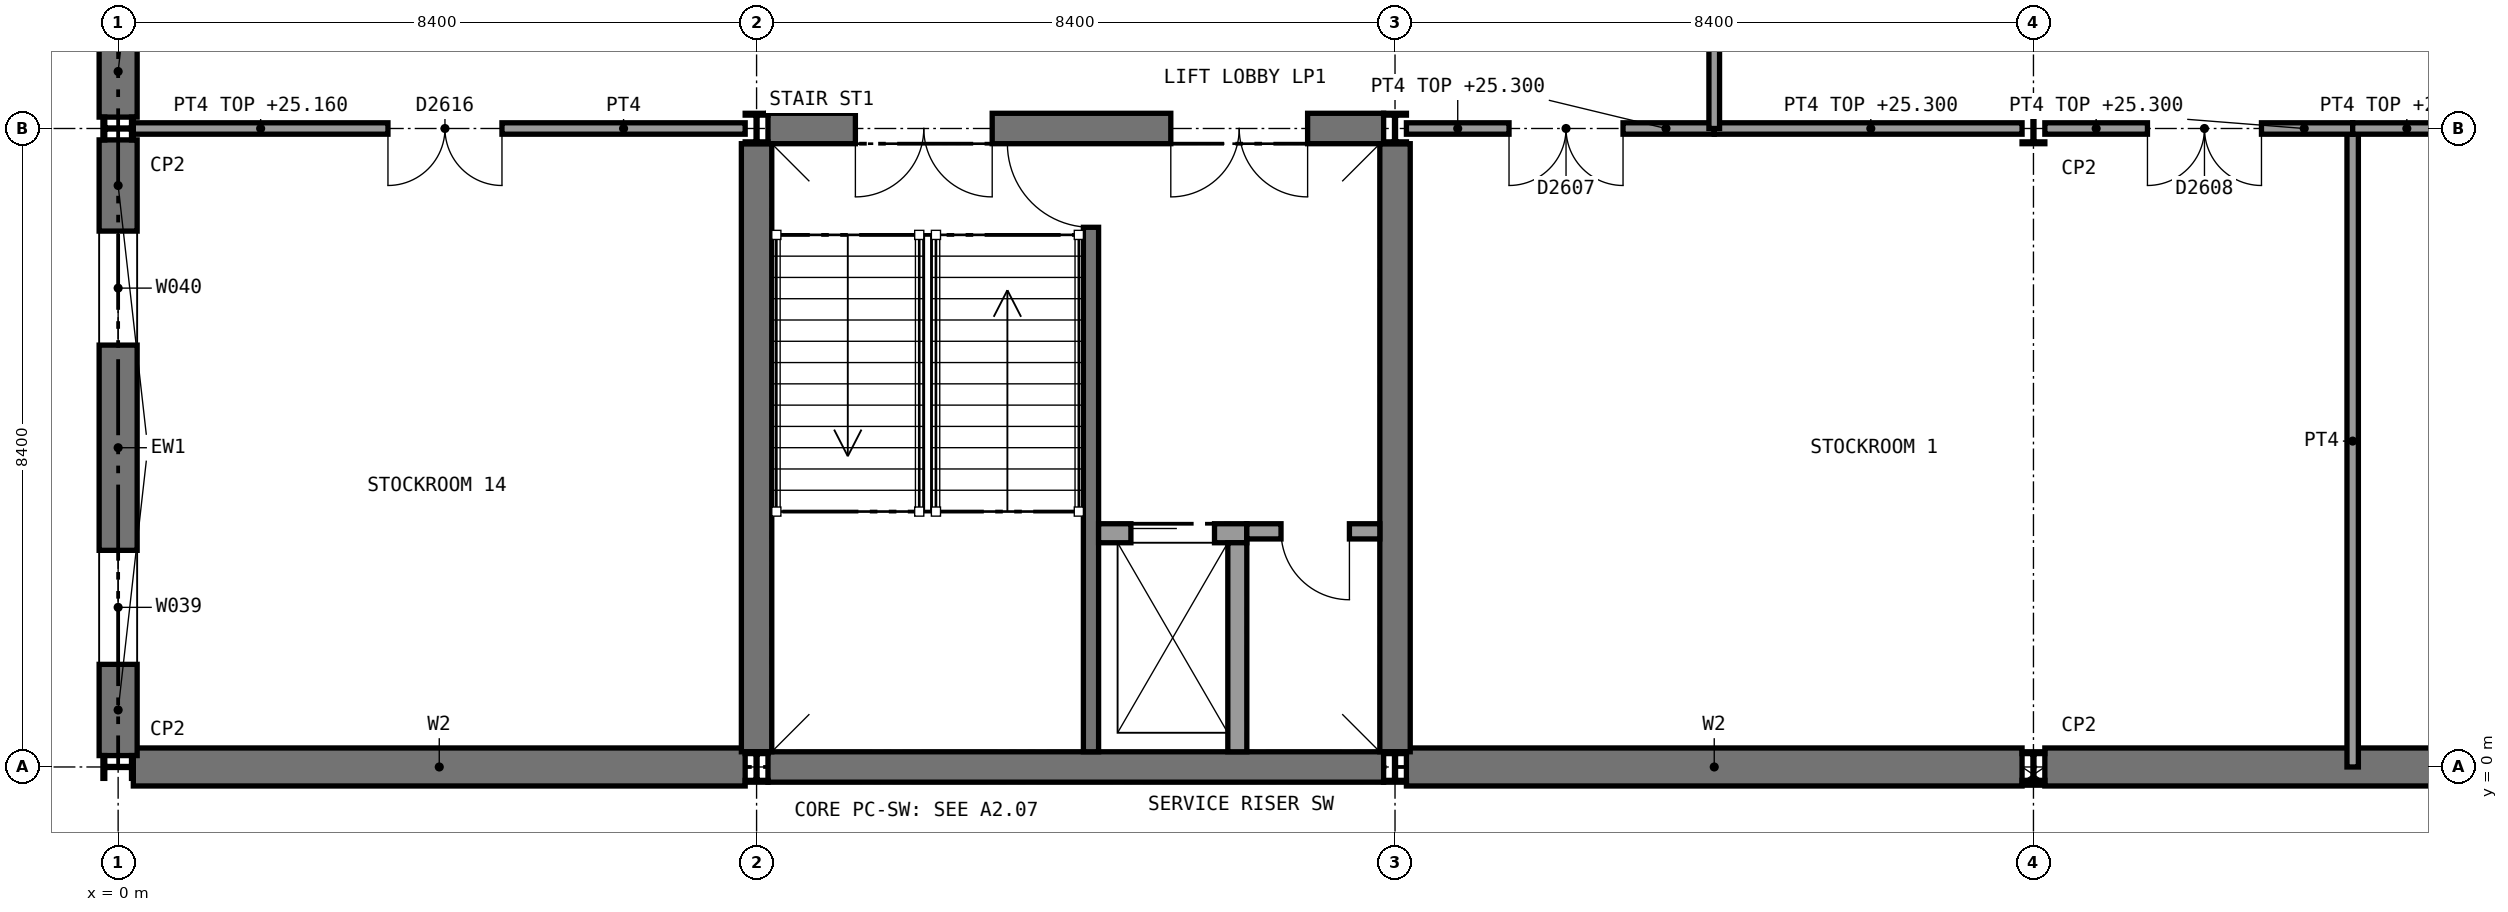
"""IFC4 building model, lengths in metres.
Left out: names, types, materials, properties, quantities, classifications, styles, units other than length and angle.
Written with IfcOpenShell. Run it as: python <this file> out.ifc"""

import sys

from ifc_helpers import new_model, si_unit, direction, frame, frame_2d, origin, origin_2d, place, context, subcontext, project, spatial, rectangle, i_section, extrude, element, fill, save


model = new_model("IFC4")
c1 = context("Model", 3, precision=1e-05, world=origin(), true_north=direction((0.0, 1.0)))
c2 = subcontext(c1, "Body", "Model", "MODEL_VIEW")
j1 = project(units=[si_unit("LENGTHUNIT", "METRE"), si_unit("PLANEANGLEUNIT", "RADIAN")], contexts=[c1])
p1 = place(None, origin())
s1 = spatial("IfcSite", under=j1, at=p1, CompositionType="ELEMENT")
p2 = place(p1, origin())
s2 = spatial("IfcBuilding", under=s1, at=p2, CompositionType="ELEMENT")
p3 = place(p2, frame((0.0, 0.0, 21.0)))
s3 = spatial("IfcBuildingStorey", under=s2, at=p3, CompositionType="ELEMENT", Elevation=21.0)
p4 = place(p3, frame((0.2, 0.0, 0.0), z_axis=(0.0, 0.0, 1.0), x_axis=(1.0, 0.0, 0.0)))
e1 = element("IfcWall", 1, at=p4, inside=s3, PredefinedType="SHEAR", context=c2, shape_type="SweptSolid", body=[
    extrude(rectangle(XDim=8.05, YDim=0.5, at=frame_2d((4.025, 0.0))), origin(), (0.0, 0.0, 1.0), 4.65),
])
p5 = place(p3, frame((16.95, 0.0, 0.0), z_axis=(0.0, 0.0, 1.0), x_axis=(1.0, 0.0, 0.0)))
e2 = element("IfcWall", 2, at=p5, inside=s3, PredefinedType="SHEAR", context=c2, shape_type="SweptSolid", body=[
    extrude(rectangle(XDim=8.1, YDim=0.5, at=frame_2d((4.05, 0.0))), origin(), (0.0, 0.0, 1.0), 4.65),
])
p6 = place(p3, frame((25.35, 0.0, 0.0), z_axis=(0.0, 0.0, 1.0), x_axis=(1.0, 0.0, 0.0)))
e3 = element("IfcWall", 3, at=p6, inside=s3, PredefinedType="SHEAR", context=c2, shape_type="SweptSolid", body=[
    extrude(rectangle(XDim=8.1, YDim=0.5, at=frame_2d((4.05, 0.0))), origin(), (0.0, 0.0, 1.0), 4.65),
])
p7 = place(p3, frame((8.55, 0.0, 0.0), z_axis=(0.0, 0.0, 1.0), x_axis=(1.0, 0.0, 0.0)))
e4 = element("IfcWall", 4, at=p7, inside=s3, PredefinedType="SHEAR", context=c2, shape_type="SweptSolid", body=[
    extrude(rectangle(XDim=8.1, YDim=0.4, at=frame_2d((4.05, 0.0))), origin(), (0.0, 0.0, 1.0), 4.65),
])
p8 = place(p3, frame((8.55, 8.4, 0.0), z_axis=(0.0, 0.0, 1.0), x_axis=(1.0, 0.0, 0.0)))
e5 = element("IfcWall", 5, at=p8, inside=s3, PredefinedType="SHEAR", context=c2, shape_type="SweptSolid", body=[
    extrude(rectangle(XDim=8.1, YDim=0.4, at=frame_2d((4.05, 0.0))), origin(), (0.0, 0.0, 1.0), 4.65),
])
p9 = place(p8, frame((1.15, 0.0, 0.0)))
e6 = element("IfcOpeningElement", 6, at=p9, cuts=e5, PredefinedType="OPENING", context=c2, shape_type="SweptSolid", body=[
    extrude(rectangle(XDim=1.8, YDim=2.1, at=frame_2d((0.9, 1.05))), frame((0.0, 0.21, 0.0), z_axis=(0.0, -1.0, 0.0), x_axis=(1.0, 0.0, 0.0)), (0.0, 0.0, 1.0), 0.42),
])
p10 = place(p8, frame((5.3, 0.0, 0.0)))
e7 = element("IfcOpeningElement", 7, at=p10, cuts=e5, PredefinedType="OPENING", context=c2, shape_type="SweptSolid", body=[
    extrude(rectangle(XDim=1.8, YDim=2.1, at=frame_2d((0.9, 1.05))), frame((0.0, 0.21, 0.0), z_axis=(0.0, -1.0, 0.0), x_axis=(1.0, 0.0, 0.0)), (0.0, 0.0, 1.0), 0.42),
])
for number, where, z_axis, x_axis in (
    (8, (8.4, 0.2, 0.0), (0.0, 0.0, 1.0), (0.0, 1.0, 0.0)),
    (9, (16.8, 0.2, 0.0), (0.0, 0.0, 1.0), (0.0, 1.0, 0.0)),
):
    element("IfcWall", number, at=place(p3, frame(where, z_axis=z_axis, x_axis=x_axis)), inside=s3, PredefinedType="SHEAR", context=c2, shape_type="SweptSolid", body=[
        extrude(rectangle(XDim=8.0, YDim=0.4, at=frame_2d((4.0, 0.0))), origin(), (0.0, 0.0, 1.0), 4.65),
    ])
for number, where, z_axis, x_axis in (
    (10, (0.0, 0.0, 0.0), (0.0, 0.0, 1.0), (0.0, 1.0, 0.0)),
    (11, (0.0, 8.4, 0.0), (0.0, 0.0, 1.0), (0.0, 1.0, 0.0)),
    (12, (8.4, 0.0, 0.0), (0.0, 0.0, 1.0), (1.0, 0.0, 0.0)),
    (13, (8.4, 8.4, 0.0), (0.0, 0.0, 1.0), (1.0, 0.0, 0.0)),
    (14, (16.8, 0.0, 0.0), (0.0, 0.0, 1.0), (1.0, 0.0, 0.0)),
    (15, (16.8, 8.4, 0.0), (0.0, 0.0, 1.0), (1.0, 0.0, 0.0)),
    (16, (25.2, 0.0, 0.0), (0.0, 0.0, 1.0), (1.0, 0.0, 0.0)),
    (17, (25.2, 8.4, 0.0), (0.0, 0.0, 1.0), (1.0, 0.0, 0.0)),
):
    element("IfcColumn", number, at=place(p3, frame(where, z_axis=z_axis, x_axis=x_axis)), inside=s3, PredefinedType="COLUMN", context=c2, shape_type="SweptSolid", body=[
        extrude(i_section(OverallWidth=0.3, OverallDepth=0.4, WebThickness=0.013, FlangeThickness=0.024, FilletRadius=0.027, at=origin_2d()), origin(), (0.0, 0.0, 1.0), 4.8),
    ])
p11 = place(p3, frame((29.4, 0.0, 0.0), z_axis=(0.0, 0.0, 1.0), x_axis=(0.0, 1.0, 0.0)))
e18 = element("IfcWall", 18, at=p11, inside=s3, PredefinedType="SOLIDWALL", context=c2, shape_type="SweptSolid", body=[
    extrude(rectangle(XDim=8.4, YDim=0.15, at=frame_2d((4.2, 0.0))), origin(), (0.0, 0.0, 1.0), 4.65),
])
p12 = place(p3, frame((16.95, 8.4, 0.0), z_axis=(0.0, 0.0, 1.0), x_axis=(1.0, 0.0, 0.0)))
e19 = element("IfcWall", 19, at=p12, inside=s3, PredefinedType="SOLIDWALL", context=c2, shape_type="SweptSolid", body=[
    extrude(rectangle(XDim=4.05, YDim=0.15, at=frame_2d((2.025, 0.0))), origin(), (0.0, 0.0, 1.0), 4.3),
])
p13 = place(p12, frame((1.35, 0.0, 0.0)))
e20 = element("IfcOpeningElement", 20, at=p13, cuts=e19, PredefinedType="OPENING", context=c2, shape_type="SweptSolid", body=[
    extrude(rectangle(XDim=1.5, YDim=2.1, at=frame_2d((0.75, 1.05))), frame((0.0, 0.085, 0.0), z_axis=(0.0, -1.0, 0.0), x_axis=(1.0, 0.0, 0.0)), (0.0, 0.0, 1.0), 0.17),
])
p14 = place(p3, frame((21.0, 8.4, 0.0), z_axis=(0.0, 0.0, 1.0), x_axis=(1.0, 0.0, 0.0)))
e21 = element("IfcWall", 21, at=p14, inside=s3, PredefinedType="SOLIDWALL", context=c2, shape_type="SweptSolid", body=[
    extrude(rectangle(XDim=4.05, YDim=0.15, at=frame_2d((2.025, 0.0))), origin(), (0.0, 0.0, 1.0), 4.3),
])
p15 = place(p3, frame((25.35, 8.4, 0.0), z_axis=(0.0, 0.0, 1.0), x_axis=(1.0, 0.0, 0.0)))
e22 = element("IfcWall", 22, at=p15, inside=s3, PredefinedType="SOLIDWALL", context=c2, shape_type="SweptSolid", body=[
    extrude(rectangle(XDim=4.05, YDim=0.15, at=frame_2d((2.025, 0.0))), origin(), (0.0, 0.0, 1.0), 4.3),
])
p16 = place(p15, frame((1.35, 0.0, 0.0)))
e23 = element("IfcOpeningElement", 23, at=p16, cuts=e22, PredefinedType="OPENING", context=c2, shape_type="SweptSolid", body=[
    extrude(rectangle(XDim=1.5, YDim=2.1, at=frame_2d((0.75, 1.05))), frame((0.0, 0.085, 0.0), z_axis=(0.0, -1.0, 0.0), x_axis=(1.0, 0.0, 0.0)), (0.0, 0.0, 1.0), 0.17),
])
p17 = place(p3, frame((29.4, 8.4, 0.0), z_axis=(0.0, 0.0, 1.0), x_axis=(1.0, 0.0, 0.0)))
e24 = element("IfcWall", 24, at=p17, inside=s3, PredefinedType="SOLIDWALL", context=c2, shape_type="SweptSolid", body=[
    extrude(rectangle(XDim=4.05, YDim=0.15, at=frame_2d((2.025, 0.0))), origin(), (0.0, 0.0, 1.0), 4.3),
])
p18 = place(p17, frame((1.35, 0.0, 0.0)))
e25 = element("IfcOpeningElement", 25, at=p18, cuts=e24, PredefinedType="OPENING", context=c2, shape_type="SweptSolid", body=[
    extrude(rectangle(XDim=1.5, YDim=2.1, at=frame_2d((0.75, 1.05))), frame((0.0, 0.085, 0.0), z_axis=(0.0, -1.0, 0.0), x_axis=(1.0, 0.0, 0.0)), (0.0, 0.0, 1.0), 0.17),
])
p19 = place(p3, frame((0.2, 8.4, 0.0), z_axis=(0.0, 0.0, 1.0), x_axis=(1.0, 0.0, 0.0)))
e26 = element("IfcWall", 26, at=p19, inside=s3, PredefinedType="SOLIDWALL", context=c2, shape_type="SweptSolid", body=[
    extrude(rectangle(XDim=8.05, YDim=0.15, at=frame_2d((4.025, 0.0))), origin(), (0.0, 0.0, 1.0), 4.16),
])
p20 = place(p19, frame((3.35, 0.0, 0.0)))
e27 = element("IfcOpeningElement", 27, at=p20, cuts=e26, PredefinedType="OPENING", context=c2, shape_type="SweptSolid", body=[
    extrude(rectangle(XDim=1.5, YDim=2.1, at=frame_2d((0.75, 1.05))), frame((0.0, 0.085, 0.0), z_axis=(0.0, -1.0, 0.0), x_axis=(1.0, 0.0, 0.0)), (0.0, 0.0, 1.0), 0.17),
])
p21 = place(p3, frame((21.0, 8.4, 0.0), z_axis=(0.0, 0.0, 1.0), x_axis=(0.0, 1.0, 0.0)))
e28 = element("IfcWall", 28, at=p21, inside=s3, PredefinedType="PARTITIONING", context=c2, shape_type="SweptSolid", body=[
    extrude(rectangle(XDim=7.6, YDim=0.14, at=frame_2d((3.8, 0.0))), origin(), (0.0, 0.0, 1.0), 4.65),
])
p22 = place(p3, frame((0.0, 0.15, 0.0), z_axis=(0.0, 0.0, 1.0), x_axis=(0.0, 1.0, 0.0)))
e29 = element("IfcWall", 29, at=p22, inside=s3, PredefinedType="STANDARD", context=c2, shape_type="SweptSolid", body=[
    extrude(rectangle(XDim=8.1, YDim=0.5, at=frame_2d((4.05, 0.0))), origin(), (0.0, 0.0, 1.0), 4.65),
])
p23 = place(p22, frame((1.2, 0.0, 1.0)))
e30 = element("IfcOpeningElement", 30, at=p23, cuts=e29, PredefinedType="OPENING", context=c2, shape_type="SweptSolid", body=[
    extrude(rectangle(XDim=1.5, YDim=2.4, at=frame_2d((0.75, 1.2))), frame((0.0, 0.26, 0.0), z_axis=(0.0, -1.0, 0.0), x_axis=(1.0, 0.0, 0.0)), (0.0, 0.0, 1.0), 0.52),
])
p24 = place(p22, frame((5.4, 0.0, 1.0)))
e31 = element("IfcOpeningElement", 31, at=p24, cuts=e29, PredefinedType="OPENING", context=c2, shape_type="SweptSolid", body=[
    extrude(rectangle(XDim=1.5, YDim=2.4, at=frame_2d((0.75, 1.2))), frame((0.0, 0.26, 0.0), z_axis=(0.0, -1.0, 0.0), x_axis=(1.0, 0.0, 0.0)), (0.0, 0.0, 1.0), 0.52),
])
p25 = place(p3, frame((0.0, 8.55, 0.0), z_axis=(0.0, 0.0, 1.0), x_axis=(0.0, 1.0, 0.0)))
e32 = element("IfcWall", 32, at=p25, inside=s3, PredefinedType="STANDARD", context=c2, shape_type="SweptSolid", body=[
    extrude(rectangle(XDim=8.1, YDim=0.5, at=frame_2d((4.05, 0.0))), origin(), (0.0, 0.0, 1.0), 4.65),
])
p26 = place(p25, frame((1.2, 0.0, 1.0)))
e33 = element("IfcOpeningElement", 33, at=p26, cuts=e32, PredefinedType="OPENING", context=c2, shape_type="SweptSolid", body=[
    extrude(rectangle(XDim=1.5, YDim=2.4, at=frame_2d((0.75, 1.2))), frame((0.0, 0.26, 0.0), z_axis=(0.0, -1.0, 0.0), x_axis=(1.0, 0.0, 0.0)), (0.0, 0.0, 1.0), 0.52),
])
p27 = place(p25, frame((5.4, 0.0, 1.0)))
e34 = element("IfcOpeningElement", 34, at=p27, cuts=e32, PredefinedType="OPENING", context=c2, shape_type="SweptSolid", body=[
    extrude(rectangle(XDim=1.5, YDim=2.4, at=frame_2d((0.75, 1.2))), frame((0.0, 0.26, 0.0), z_axis=(0.0, -1.0, 0.0), x_axis=(1.0, 0.0, 0.0)), (0.0, 0.0, 1.0), 0.52),
])
p28 = place(p3, frame((12.8, 0.2, 0.0), z_axis=(0.0, 0.0, 1.0), x_axis=(0.0, 1.0, 0.0)))
e35 = element("IfcWall", 35, at=p28, inside=s3, PredefinedType="SHEAR", context=c2, shape_type="SweptSolid", body=[
    extrude(rectangle(XDim=8.0, YDim=0.2, at=frame_2d((4.0, 0.0))), origin(), (0.0, 0.0, 1.0), 4.65),
])
p29 = place(p28, frame((6.9, 0.0, 0.0)))
e36 = element("IfcOpeningElement", 36, at=p29, cuts=e35, PredefinedType="OPENING", context=c2, shape_type="SweptSolid", body=[
    extrude(rectangle(XDim=1.11, YDim=2.1, at=frame_2d((0.555, 1.05))), frame((0.0, 0.11, 0.0), z_axis=(0.0, -1.0, 0.0), x_axis=(1.0, 0.0, 0.0)), (0.0, 0.0, 1.0), 0.22),
])
p30 = place(p3, frame((12.9, 3.075, 0.0), z_axis=(0.0, 0.0, 1.0), x_axis=(1.0, 0.0, 0.0)))
e37 = element("IfcWall", 37, at=p30, inside=s3, PredefinedType="SOLIDWALL", context=c2, shape_type="SweptSolid", body=[
    extrude(rectangle(XDim=1.95, YDim=0.25, at=frame_2d((0.975, 0.0))), origin(), (0.0, 0.0, 1.0), 4.8),
])
p31 = place(p30, frame((0.425, 0.0, 0.0)))
e38 = element("IfcOpeningElement", 38, at=p31, cuts=e37, PredefinedType="OPENING", context=c2, shape_type="SweptSolid", body=[
    extrude(rectangle(XDim=1.1, YDim=2.1, at=frame_2d((0.55, 1.05))), frame((0.0, 0.135, 0.0), z_axis=(0.0, -1.0, 0.0), x_axis=(1.0, 0.0, 0.0)), (0.0, 0.0, 1.0), 0.27),
])
p32 = place(p3, frame((14.725, 0.2, 0.0), z_axis=(0.0, 0.0, 1.0), x_axis=(0.0, 1.0, 0.0)))
e39 = element("IfcWall", 39, at=p32, inside=s3, PredefinedType="SOLIDWALL", context=c2, shape_type="SweptSolid", body=[
    extrude(rectangle(XDim=2.75, YDim=0.25, at=frame_2d((1.375, 0.0))), origin(), (0.0, 0.0, 1.0), 4.8),
])
p33 = place(p3, frame((14.85, 3.1, 0.0), z_axis=(0.0, 0.0, 1.0), x_axis=(1.0, 0.0, 0.0)))
e40 = element("IfcWall", 40, at=p33, inside=s3, PredefinedType="PARTITIONING", context=c2, shape_type="SweptSolid", body=[
    extrude(rectangle(XDim=1.75, YDim=0.2, at=frame_2d((0.875, 0.0))), origin(), (0.0, 0.0, 1.0), 4.65),
])
p34 = place(p33, frame((0.45, 0.0, 0.0)))
e41 = element("IfcOpeningElement", 41, at=p34, cuts=e40, PredefinedType="OPENING", context=c2, shape_type="SweptSolid", body=[
    extrude(rectangle(XDim=0.9, YDim=2.1, at=frame_2d((0.45, 1.05))), frame((0.0, 0.11, 0.0), z_axis=(0.0, -1.0, 0.0), x_axis=(1.0, 0.0, 0.0)), (0.0, 0.0, 1.0), 0.22),
])
p35 = place(p13, frame((1.5, 0.0, 0.0), z_axis=(0.0, 0.0, 1.0), x_axis=(-1.0, 0.0, 0.0)))
e42 = element("IfcDoor", 42, at=p35, inside=s3, OperationType="DOUBLE_DOOR_SINGLE_SWING", PredefinedType="DOOR", context=c2, shape_type="SweptSolid", body=[
    extrude(rectangle(XDim=1.5, YDim=2.1, at=frame_2d((0.75, 1.05))), frame((0.0, 0.025, 0.0), z_axis=(0.0, -1.0, 0.0), x_axis=(1.0, 0.0, 0.0)), (0.0, 0.0, 1.0), 0.05),
])
fill(e20, e42)
p36 = place(p16, frame((1.5, 0.0, 0.0), z_axis=(0.0, 0.0, 1.0), x_axis=(-1.0, 0.0, 0.0)))
e43 = element("IfcDoor", 43, at=p36, inside=s3, OperationType="DOUBLE_DOOR_SINGLE_SWING", PredefinedType="DOOR", context=c2, shape_type="SweptSolid", body=[
    extrude(rectangle(XDim=1.5, YDim=2.1, at=frame_2d((0.75, 1.05))), frame((0.0, 0.025, 0.0), z_axis=(0.0, -1.0, 0.0), x_axis=(1.0, 0.0, 0.0)), (0.0, 0.0, 1.0), 0.05),
])
fill(e23, e43)
p37 = place(p20, frame((1.5, 0.0, 0.0), z_axis=(0.0, 0.0, 1.0), x_axis=(-1.0, 0.0, 0.0)))
e44 = element("IfcDoor", 44, at=p37, inside=s3, OperationType="DOUBLE_DOOR_SINGLE_SWING", PredefinedType="DOOR", context=c2, shape_type="SweptSolid", body=[
    extrude(rectangle(XDim=1.5, YDim=2.1, at=frame_2d((0.75, 1.05))), frame((0.0, 0.025, 0.0), z_axis=(0.0, -1.0, 0.0), x_axis=(1.0, 0.0, 0.0)), (0.0, 0.0, 1.0), 0.05),
])
fill(e27, e44)
p38 = place(p23, origin())
e45 = element("IfcWindow", 45, at=p38, inside=s3, PartitioningType="SINGLE_PANEL", PredefinedType="WINDOW", context=c2, shape_type="SweptSolid", body=[
    extrude(rectangle(XDim=1.5, YDim=2.4, at=frame_2d((0.75, 1.2))), frame((0.0, 0.03, 0.0), z_axis=(0.0, -1.0, 0.0), x_axis=(1.0, 0.0, 0.0)), (0.0, 0.0, 1.0), 0.06),
])
fill(e30, e45)
p39 = place(p24, origin())
e46 = element("IfcWindow", 46, at=p39, inside=s3, PartitioningType="SINGLE_PANEL", PredefinedType="WINDOW", context=c2, shape_type="SweptSolid", body=[
    extrude(rectangle(XDim=1.5, YDim=2.4, at=frame_2d((0.75, 1.2))), frame((0.0, 0.03, 0.0), z_axis=(0.0, -1.0, 0.0), x_axis=(1.0, 0.0, 0.0)), (0.0, 0.0, 1.0), 0.06),
])
fill(e31, e46)
p40 = place(p29, origin())
e47 = element("IfcDoor", 47, at=p40, inside=s3, OperationType="SINGLE_SWING_RIGHT", PredefinedType="DOOR", context=c2, shape_type="SweptSolid", body=[
    extrude(rectangle(XDim=1.1, YDim=2.1, at=frame_2d((0.55, 1.05))), frame((0.0, 0.025, 0.0), z_axis=(0.0, -1.0, 0.0), x_axis=(1.0, 0.0, 0.0)), (0.0, 0.0, 1.0), 0.05),
])
fill(e36, e47)
p41 = place(p31, origin())
e48 = element("IfcDoor", 48, at=p41, inside=s3, OperationType="SLIDING_TO_LEFT", PredefinedType="DOOR", context=c2, shape_type="SweptSolid", body=[
    extrude(rectangle(XDim=1.1, YDim=2.1, at=frame_2d((0.55, 1.05))), frame((0.0, 0.025, 0.0), z_axis=(0.0, -1.0, 0.0), x_axis=(1.0, 0.0, 0.0)), (0.0, 0.0, 1.0), 0.05),
])
fill(e38, e48)
p42 = place(p34, frame((0.9, 0.0, 0.0), z_axis=(0.0, 0.0, 1.0), x_axis=(-1.0, 0.0, 0.0)))
e49 = element("IfcDoor", 49, at=p42, inside=s3, OperationType="SINGLE_SWING_LEFT", PredefinedType="DOOR", context=c2, shape_type="SweptSolid", body=[
    extrude(rectangle(XDim=0.9, YDim=2.1, at=frame_2d((0.45, 1.05))), frame((0.0, 0.025, 0.0), z_axis=(0.0, -1.0, 0.0), x_axis=(1.0, 0.0, 0.0)), (0.0, 0.0, 1.0), 0.05),
])
fill(e41, e49)
p43 = place(p9, frame((1.8, 0.0, 0.0), z_axis=(0.0, 0.0, 1.0), x_axis=(-1.0, 0.0, 0.0)))
e50 = element("IfcDoor", 50, at=p43, inside=s3, OperationType="DOUBLE_DOOR_SINGLE_SWING", PredefinedType="DOOR", context=c2, shape_type="SweptSolid", body=[
    extrude(rectangle(XDim=1.8, YDim=2.1, at=frame_2d((0.9, 1.05))), frame((0.0, 0.025, 0.0), z_axis=(0.0, -1.0, 0.0), x_axis=(1.0, 0.0, 0.0)), (0.0, 0.0, 1.0), 0.05),
])
fill(e6, e50)
p44 = place(p10, frame((1.8, 0.0, 0.0), z_axis=(0.0, 0.0, 1.0), x_axis=(-1.0, 0.0, 0.0)))
e51 = element("IfcDoor", 51, at=p44, inside=s3, OperationType="DOUBLE_DOOR_SINGLE_SWING", PredefinedType="DOOR", context=c2, shape_type="SweptSolid", body=[
    extrude(rectangle(XDim=1.8, YDim=2.1, at=frame_2d((0.9, 1.05))), frame((0.0, 0.025, 0.0), z_axis=(0.0, -1.0, 0.0), x_axis=(1.0, 0.0, 0.0)), (0.0, 0.0, 1.0), 0.05),
])
fill(e7, e51)
save(model, sys.argv[1])
